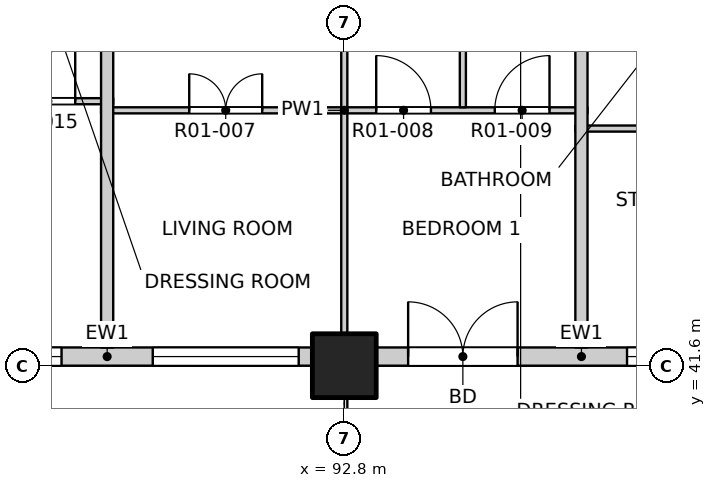
"""IFC4 building model, lengths in metres.
Left out: names, types, materials, properties, quantities, classifications, styles, units other than length and angle.
Written with IfcOpenShell. Run it as: python <this file> out.ifc"""

import sys

from ifc_helpers import new_model, si_unit, direction, frame, frame_2d, origin, origin_2d, place, context, subcontext, project, spatial, rectangle, extrude, element, fill, save


model = new_model("IFC4")
c1 = context("Model", 3, precision=1e-05, world=origin(), true_north=direction((0.0, 1.0)))
c2 = subcontext(c1, "Body", "Model", "MODEL_VIEW")
j1 = project(units=[si_unit("LENGTHUNIT", "METRE"), si_unit("PLANEANGLEUNIT", "RADIAN")], contexts=[c1])
p1 = place(None, origin())
s1 = spatial("IfcSite", under=j1, at=p1, CompositionType="ELEMENT")
p2 = place(p1, origin())
s2 = spatial("IfcBuilding", under=s1, at=p2, CompositionType="ELEMENT")
p3 = place(p2, frame((0.0, 0.0, 26.3)))
s3 = spatial("IfcBuildingStorey", under=s2, at=p3, CompositionType="ELEMENT", Elevation=26.3)
p4 = place(p3, frame((92.8, 41.6, -0.25), z_axis=(0.0, 0.0, 1.0), x_axis=(1.0, 0.0, 0.0)))
e1 = element("IfcColumn", 1, at=p4, inside=s3, PredefinedType="COLUMN", context=c2, shape_type="SweptSolid", body=[
    extrude(rectangle(XDim=1.05, YDim=1.05, at=origin_2d()), origin(), (0.0, 0.0, 1.0), 3.4),
])
p5 = place(p3, frame((85.525, 41.75, 0.0), z_axis=(0.0, 0.0, 1.0), x_axis=(1.0, 0.0, 0.0)))
e2 = element("IfcWall", 2, at=p5, inside=s3, PredefinedType="SOLIDWALL", context=c2, shape_type="SweptSolid", body=[
    extrude(rectangle(XDim=6.75, YDim=0.3, at=frame_2d((3.375, 0.0))), origin(), (0.0, 0.0, 1.0), 2.7),
])
p6 = place(p5, frame((0.225, 0.0, 0.9)))
e3 = element("IfcOpeningElement", 3, at=p6, cuts=e2, PredefinedType="OPENING", context=c2, shape_type="SweptSolid", body=[
    extrude(rectangle(XDim=2.4, YDim=1.8, at=frame_2d((1.2, 0.9))), frame((0.0, 0.16, 0.0), z_axis=(0.0, -1.0, 0.0), x_axis=(1.0, 0.0, 0.0)), (0.0, 0.0, 1.0), 0.32),
])
p7 = place(p5, frame((4.125, 0.0, 0.9)))
e4 = element("IfcOpeningElement", 4, at=p7, cuts=e2, PredefinedType="OPENING", context=c2, shape_type="SweptSolid", body=[
    extrude(rectangle(XDim=2.4, YDim=1.8, at=frame_2d((1.2, 0.9))), frame((0.0, 0.16, 0.0), z_axis=(0.0, -1.0, 0.0), x_axis=(1.0, 0.0, 0.0)), (0.0, 0.0, 1.0), 0.32),
])
p8 = place(p3, frame((93.325, 41.75, 0.0), z_axis=(0.0, 0.0, 1.0), x_axis=(1.0, 0.0, 0.0)))
e5 = element("IfcWall", 5, at=p8, inside=s3, PredefinedType="SOLIDWALL", context=c2, shape_type="SweptSolid", body=[
    extrude(rectangle(XDim=6.75, YDim=0.3, at=frame_2d((3.375, 0.0))), origin(), (0.0, 0.0, 1.0), 2.7),
])
p9 = place(p8, frame((0.525, 0.0, 0.0)))
e6 = element("IfcOpeningElement", 6, at=p9, cuts=e5, PredefinedType="OPENING", context=c2, shape_type="SweptSolid", body=[
    extrude(rectangle(XDim=1.8, YDim=2.4, at=frame_2d((0.9, 1.2))), frame((0.0, 0.16, 0.0), z_axis=(0.0, -1.0, 0.0), x_axis=(1.0, 0.0, 0.0)), (0.0, 0.0, 1.0), 0.32),
])
p10 = place(p8, frame((4.125, 0.0, 0.9)))
e7 = element("IfcOpeningElement", 7, at=p10, cuts=e5, PredefinedType="OPENING", context=c2, shape_type="SweptSolid", body=[
    extrude(rectangle(XDim=2.4, YDim=1.8, at=frame_2d((1.2, 0.9))), frame((0.0, 0.16, 0.0), z_axis=(0.0, -1.0, 0.0), x_axis=(1.0, 0.0, 0.0)), (0.0, 0.0, 1.0), 0.32),
])
p11 = place(p3, frame((96.6, 45.5, 0.0), z_axis=(0.0, 0.0, 1.0), x_axis=(1.0, 0.0, 0.0)))
e8 = element("IfcWall", 8, at=p11, inside=s3, PredefinedType="PARTITIONING", context=c2, shape_type="SweptSolid", body=[
    extrude(rectangle(XDim=11.5, YDim=0.1, at=frame_2d((5.75, 0.0))), origin(), (0.0, 0.0, 1.0), 3.15),
])
p12 = place(p11, frame((2.635, 0.0, 0.0)))
e9 = element("IfcOpeningElement", 9, at=p12, cuts=e8, PredefinedType="OPENING", context=c2, shape_type="SweptSolid", body=[
    extrude(rectangle(XDim=0.9, YDim=2.1, at=frame_2d((0.45, 1.05))), frame((0.0, 0.06, 0.0), z_axis=(0.0, -1.0, 0.0), x_axis=(1.0, 0.0, 0.0)), (0.0, 0.0, 1.0), 0.12),
])
p13 = place(p3, frame((88.8, 45.8, 0.0), z_axis=(0.0, 0.0, 1.0), x_axis=(1.0, 0.0, 0.0)))
e10 = element("IfcWall", 10, at=p13, inside=s3, PredefinedType="PARTITIONING", context=c2, shape_type="SweptSolid", body=[
    extrude(rectangle(XDim=8.0, YDim=0.1, at=frame_2d((4.0, 0.0))), origin(), (0.0, 0.0, 1.0), 3.15),
])
p14 = place(p13, frame((1.45, 0.0, 0.0)))
e11 = element("IfcOpeningElement", 11, at=p14, cuts=e10, PredefinedType="OPENING", context=c2, shape_type="SweptSolid", body=[
    extrude(rectangle(XDim=1.2, YDim=2.1, at=frame_2d((0.6, 1.05))), frame((0.0, 0.06, 0.0), z_axis=(0.0, -1.0, 0.0), x_axis=(1.0, 0.0, 0.0)), (0.0, 0.0, 1.0), 0.12),
])
p15 = place(p13, frame((4.525, 0.0, 0.0)))
e12 = element("IfcOpeningElement", 12, at=p15, cuts=e10, PredefinedType="OPENING", context=c2, shape_type="SweptSolid", body=[
    extrude(rectangle(XDim=0.9, YDim=2.1, at=frame_2d((0.45, 1.05))), frame((0.0, 0.06, 0.0), z_axis=(0.0, -1.0, 0.0), x_axis=(1.0, 0.0, 0.0)), (0.0, 0.0, 1.0), 0.12),
])
p16 = place(p13, frame((6.475, 0.0, 0.0)))
e13 = element("IfcOpeningElement", 13, at=p16, cuts=e10, PredefinedType="OPENING", context=c2, shape_type="SweptSolid", body=[
    extrude(rectangle(XDim=0.9, YDim=2.1, at=frame_2d((0.45, 1.05))), frame((0.0, 0.06, 0.0), z_axis=(0.0, -1.0, 0.0), x_axis=(1.0, 0.0, 0.0)), (0.0, 0.0, 1.0), 0.12),
])
p17 = place(p3, frame((73.2, 45.95, 0.0), z_axis=(0.0, 0.0, 1.0), x_axis=(1.0, 0.0, 0.0)))
e14 = element("IfcWall", 14, at=p17, inside=s3, PredefinedType="PARTITIONING", context=c2, shape_type="SweptSolid", body=[
    extrude(rectangle(XDim=15.8, YDim=0.1, at=frame_2d((7.9, 0.0))), origin(), (0.0, 0.0, 1.0), 3.15),
])
p18 = place(p17, frame((0.625, 0.0, 0.0)))
e15 = element("IfcOpeningElement", 15, at=p18, cuts=e14, PredefinedType="OPENING", context=c2, shape_type="SweptSolid", body=[
    extrude(rectangle(XDim=0.9, YDim=2.1, at=frame_2d((0.45, 1.05))), frame((0.0, 0.06, 0.0), z_axis=(0.0, -1.0, 0.0), x_axis=(1.0, 0.0, 0.0)), (0.0, 0.0, 1.0), 0.12),
])
p19 = place(p17, frame((2.575, 0.0, 0.0)))
e16 = element("IfcOpeningElement", 16, at=p19, cuts=e14, PredefinedType="OPENING", context=c2, shape_type="SweptSolid", body=[
    extrude(rectangle(XDim=0.9, YDim=2.1, at=frame_2d((0.45, 1.05))), frame((0.0, 0.06, 0.0), z_axis=(0.0, -1.0, 0.0), x_axis=(1.0, 0.0, 0.0)), (0.0, 0.0, 1.0), 0.12),
])
p20 = place(p17, frame((5.35, 0.0, 0.0)))
e17 = element("IfcOpeningElement", 17, at=p20, cuts=e14, PredefinedType="OPENING", context=c2, shape_type="SweptSolid", body=[
    extrude(rectangle(XDim=1.2, YDim=2.1, at=frame_2d((0.6, 1.05))), frame((0.0, 0.06, 0.0), z_axis=(0.0, -1.0, 0.0), x_axis=(1.0, 0.0, 0.0)), (0.0, 0.0, 1.0), 0.12),
])
p21 = place(p17, frame((9.25, 0.0, 0.0)))
e18 = element("IfcOpeningElement", 18, at=p21, cuts=e14, PredefinedType="OPENING", context=c2, shape_type="SweptSolid", body=[
    extrude(rectangle(XDim=1.2, YDim=2.1, at=frame_2d((0.6, 1.05))), frame((0.0, 0.06, 0.0), z_axis=(0.0, -1.0, 0.0), x_axis=(1.0, 0.0, 0.0)), (0.0, 0.0, 1.0), 0.12),
])
p22 = place(p17, frame((12.325, 0.0, 0.0)))
e19 = element("IfcOpeningElement", 19, at=p22, cuts=e14, PredefinedType="OPENING", context=c2, shape_type="SweptSolid", body=[
    extrude(rectangle(XDim=0.9, YDim=2.1, at=frame_2d((0.45, 1.05))), frame((0.0, 0.06, 0.0), z_axis=(0.0, -1.0, 0.0), x_axis=(1.0, 0.0, 0.0)), (0.0, 0.0, 1.0), 0.12),
])
p23 = place(p17, frame((14.275, 0.0, 0.0)))
e20 = element("IfcOpeningElement", 20, at=p23, cuts=e14, PredefinedType="OPENING", context=c2, shape_type="SweptSolid", body=[
    extrude(rectangle(XDim=0.9, YDim=2.1, at=frame_2d((0.45, 1.05))), frame((0.0, 0.06, 0.0), z_axis=(0.0, -1.0, 0.0), x_axis=(1.0, 0.0, 0.0)), (0.0, 0.0, 1.0), 0.12),
])
p24 = place(p3, frame((88.9, 41.9, 0.0), z_axis=(0.0, 0.0, 1.0), x_axis=(0.0, 1.0, 0.0)))
e21 = element("IfcWall", 21, at=p24, inside=s3, PredefinedType="PARTITIONING", context=c2, shape_type="SweptSolid", body=[
    extrude(rectangle(XDim=11.3, YDim=0.2, at=frame_2d((5.65, 0.0))), origin(), (0.0, 0.0, 1.0), 3.15),
])
p25 = place(p3, frame((92.8, 41.9, 0.0), z_axis=(0.0, 0.0, 1.0), x_axis=(0.0, 1.0, 0.0)))
e22 = element("IfcWall", 22, at=p25, inside=s3, PredefinedType="PARTITIONING", context=c2, shape_type="SweptSolid", body=[
    extrude(rectangle(XDim=7.45, YDim=0.1, at=frame_2d((3.725, 0.0))), origin(), (0.0, 0.0, 1.0), 2.55),
])
p26 = place(p3, frame((94.75, 45.85, 0.0), z_axis=(0.0, 0.0, 1.0), x_axis=(0.0, 1.0, 0.0)))
e23 = element("IfcWall", 23, at=p26, inside=s3, PredefinedType="PARTITIONING", context=c2, shape_type="SweptSolid", body=[
    extrude(rectangle(XDim=3.5, YDim=0.1, at=frame_2d((1.75, 0.0))), origin(), (0.0, 0.0, 1.0), 3.15),
])
p27 = place(p3, frame((96.7, 41.9, 0.0), z_axis=(0.0, 0.0, 1.0), x_axis=(0.0, 1.0, 0.0)))
e24 = element("IfcWall", 24, at=p27, inside=s3, PredefinedType="PARTITIONING", context=c2, shape_type="SweptSolid", body=[
    extrude(rectangle(XDim=11.3, YDim=0.2, at=frame_2d((5.65, 0.0))), origin(), (0.0, 0.0, 1.0), 3.15),
])
p28 = place(p6, origin())
e25 = element("IfcWindow", 25, at=p28, inside=s3, PartitioningType="DOUBLE_PANEL_VERTICAL", PredefinedType="WINDOW", context=c2, shape_type="SweptSolid", body=[
    extrude(rectangle(XDim=2.4, YDim=1.8, at=frame_2d((1.2, 0.9))), frame((0.0, 0.03, 0.0), z_axis=(0.0, -1.0, 0.0), x_axis=(1.0, 0.0, 0.0)), (0.0, 0.0, 1.0), 0.06),
])
fill(e3, e25)
p29 = place(p7, origin())
e26 = element("IfcWindow", 26, at=p29, inside=s3, PartitioningType="DOUBLE_PANEL_VERTICAL", PredefinedType="WINDOW", context=c2, shape_type="SweptSolid", body=[
    extrude(rectangle(XDim=2.4, YDim=1.8, at=frame_2d((1.2, 0.9))), frame((0.0, 0.03, 0.0), z_axis=(0.0, -1.0, 0.0), x_axis=(1.0, 0.0, 0.0)), (0.0, 0.0, 1.0), 0.06),
])
fill(e4, e26)
p30 = place(p9, origin())
e27 = element("IfcDoor", 27, at=p30, inside=s3, OperationType="DOUBLE_DOOR_SINGLE_SWING", PredefinedType="DOOR", context=c2, shape_type="SweptSolid", body=[
    extrude(rectangle(XDim=1.8, YDim=2.4, at=frame_2d((0.9, 1.2))), frame((0.0, 0.025, 0.0), z_axis=(0.0, -1.0, 0.0), x_axis=(1.0, 0.0, 0.0)), (0.0, 0.0, 1.0), 0.05),
])
fill(e6, e27)
p31 = place(p10, origin())
e28 = element("IfcWindow", 28, at=p31, inside=s3, PartitioningType="DOUBLE_PANEL_VERTICAL", PredefinedType="WINDOW", context=c2, shape_type="SweptSolid", body=[
    extrude(rectangle(XDim=2.4, YDim=1.8, at=frame_2d((1.2, 0.9))), frame((0.0, 0.03, 0.0), z_axis=(0.0, -1.0, 0.0), x_axis=(1.0, 0.0, 0.0)), (0.0, 0.0, 1.0), 0.06),
])
fill(e7, e28)
p32 = place(p14, origin())
e29 = element("IfcDoor", 29, at=p32, inside=s3, OperationType="DOUBLE_DOOR_SINGLE_SWING", PredefinedType="DOOR", context=c2, shape_type="SweptSolid", body=[
    extrude(rectangle(XDim=1.2, YDim=2.1, at=frame_2d((0.6, 1.05))), frame((0.0, 0.025, 0.0), z_axis=(0.0, -1.0, 0.0), x_axis=(1.0, 0.0, 0.0)), (0.0, 0.0, 1.0), 0.05),
])
fill(e11, e29)
p33 = place(p15, origin())
e30 = element("IfcDoor", 30, at=p33, inside=s3, OperationType="SINGLE_SWING_LEFT", PredefinedType="DOOR", context=c2, shape_type="SweptSolid", body=[
    extrude(rectangle(XDim=0.9, YDim=2.1, at=frame_2d((0.45, 1.05))), frame((0.0, 0.025, 0.0), z_axis=(0.0, -1.0, 0.0), x_axis=(1.0, 0.0, 0.0)), (0.0, 0.0, 1.0), 0.05),
])
fill(e12, e30)
p34 = place(p16, origin())
e31 = element("IfcDoor", 31, at=p34, inside=s3, OperationType="SINGLE_SWING_RIGHT", PredefinedType="DOOR", context=c2, shape_type="SweptSolid", body=[
    extrude(rectangle(XDim=0.9, YDim=2.1, at=frame_2d((0.45, 1.05))), frame((0.0, 0.025, 0.0), z_axis=(0.0, -1.0, 0.0), x_axis=(1.0, 0.0, 0.0)), (0.0, 0.0, 1.0), 0.05),
])
fill(e13, e31)
p35 = place(p23, origin())
e32 = element("IfcDoor", 32, at=p35, inside=s3, OperationType="SINGLE_SWING_RIGHT", PredefinedType="DOOR", context=c2, shape_type="SweptSolid", body=[
    extrude(rectangle(XDim=0.9, YDim=2.1, at=frame_2d((0.45, 1.05))), frame((0.0, 0.025, 0.0), z_axis=(0.0, -1.0, 0.0), x_axis=(1.0, 0.0, 0.0)), (0.0, 0.0, 1.0), 0.05),
])
fill(e20, e32)
save(model, sys.argv[1])
